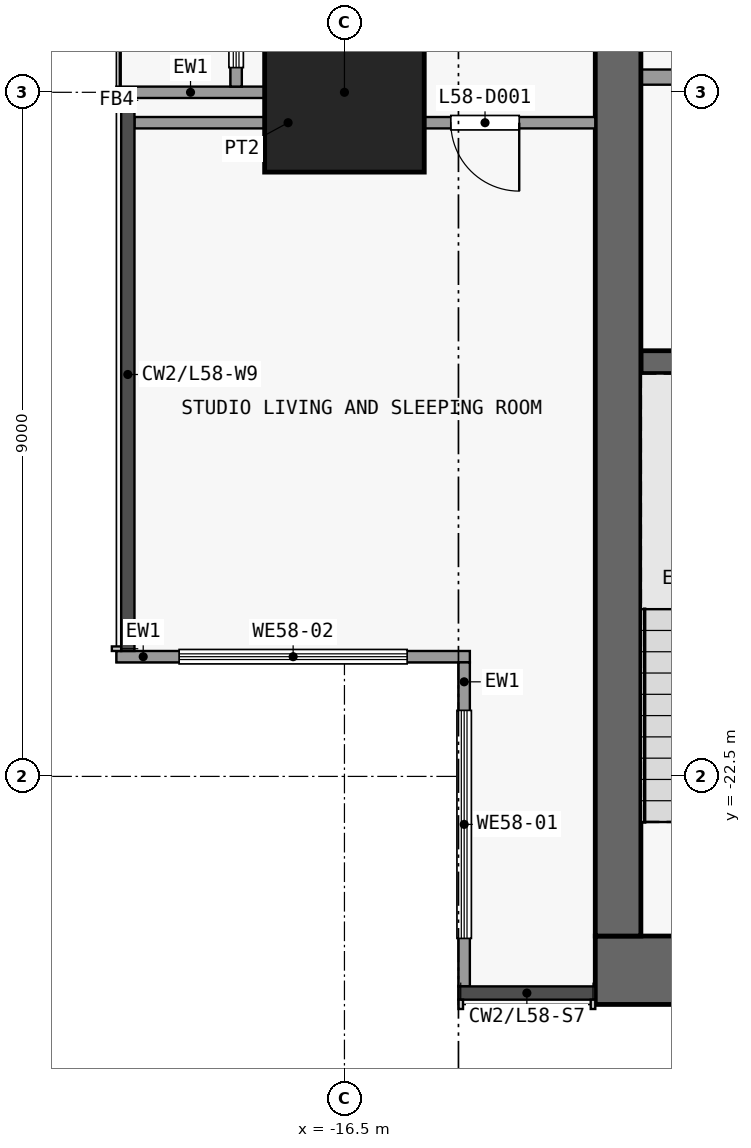
"""IFC4 building model, lengths in metres.
Left out: names, types, materials, properties, quantities, classifications, styles, units other than length and angle.
Written with IfcOpenShell. Run it as: python <this file> out.ifc"""

import sys

from ifc_helpers import new_model, si_unit, direction, frame, frame_2d, origin, origin_2d, place, context, subcontext, project, spatial, rectangle, extrude, element, fill, save


model = new_model("IFC4")
c1 = context("Model", 3, precision=1e-05, world=origin(), true_north=direction((0.0, 1.0)))
c2 = subcontext(c1, "Body", "Model", "MODEL_VIEW")
j1 = project(units=[si_unit("LENGTHUNIT", "METRE"), si_unit("PLANEANGLEUNIT", "RADIAN")], contexts=[c1])
p1 = place(None, origin())
s1 = spatial("IfcSite", under=j1, at=p1, CompositionType="ELEMENT")
p2 = place(p1, origin())
s2 = spatial("IfcBuilding", under=s1, at=p2, CompositionType="ELEMENT")
p3 = place(p2, frame((0.0, 0.0, 230.3)))
s3 = spatial("IfcBuildingStorey", under=s2, at=p3, CompositionType="ELEMENT", Elevation=230.3)
p4 = place(p3, frame((-16.5, -13.5, 0.0), z_axis=(0.0, 0.0, 1.0), x_axis=(1.0, 0.0, 0.0)))
e1 = element("IfcColumn", 1, at=p4, inside=s3, PredefinedType="COLUMN", context=c2, shape_type="SweptSolid", body=[
    extrude(rectangle(XDim=2.1, YDim=2.1, at=origin_2d()), origin(), (0.0, 0.0, 1.0), 3.6),
])
p5 = place(p3, frame((-13.2, -25.05, 0.0), z_axis=(0.0, 0.0, 1.0), x_axis=(1.0, 0.0, 0.0)))
e2 = element("IfcWall", 2, at=p5, inside=s3, PredefinedType="SHEAR", context=c2, shape_type="SweptSolid", body=[
    extrude(rectangle(XDim=26.4, YDim=0.9, at=frame_2d((13.2, 0.0))), origin(), (0.0, 0.0, 1.0), 3.3),
])
p6 = place(p3, frame((-12.9, -24.6, 0.0), z_axis=(0.0, 0.0, 1.0), x_axis=(0.0, 1.0, 0.0)))
e3 = element("IfcWall", 3, at=p6, inside=s3, PredefinedType="SHEAR", context=c2, shape_type="SweptSolid", body=[
    extrude(rectangle(XDim=16.1, YDim=0.6, at=frame_2d((8.05, 0.0))), origin(), (0.0, 0.0, 1.0), 3.3),
])
p7 = place(p3, frame((-12.6, -17.05, 0.0), z_axis=(0.0, 0.0, 1.0), x_axis=(1.0, 0.0, 0.0)))
e4 = element("IfcWall", 4, at=p7, inside=s3, PredefinedType="SHEAR", context=c2, shape_type="SweptSolid", body=[
    extrude(rectangle(XDim=3.1, YDim=0.3, at=frame_2d((1.55, 0.0))), origin(), (0.0, 0.0, 1.0), 3.3),
])
p8 = place(p3, frame((-12.6, -13.3, 0.0), z_axis=(0.0, 0.0, 1.0), x_axis=(1.0, 0.0, 0.0)))
e5 = element("IfcWall", 5, at=p8, inside=s3, PredefinedType="PARTITIONING", context=c2, shape_type="SweptSolid", body=[
    extrude(rectangle(XDim=1.45, YDim=0.2, at=frame_2d((0.725, 0.0))), origin(), (0.0, 0.0, 1.0), 3.3),
])
p9 = place(p3, frame((-14.925, -25.262, 0.0), z_axis=(0.0, 0.0, 1.0), x_axis=(0.0, 1.0, 0.0)))
e6 = element("IfcWall", 6, at=p9, inside=s3, PredefinedType="SOLIDWALL", context=c2, shape_type="SweptSolid", body=[
    extrude(rectangle(XDim=4.262, YDim=0.15, at=frame_2d((2.131, 0.0))), origin(), (0.0, 0.0, 1.0), 3.3),
])
p10 = place(p9, frame((0.631, 0.0, 0.9)))
e7 = element("IfcOpeningElement", 7, at=p10, cuts=e6, PredefinedType="OPENING", context=c2, shape_type="SweptSolid", body=[
    extrude(rectangle(XDim=3.0, YDim=2.4, at=frame_2d((1.5, 1.2))), frame((0.0, 0.085, 0.0), z_axis=(0.0, -1.0, 0.0), x_axis=(1.0, 0.0, 0.0)), (0.0, 0.0, 1.0), 0.17),
])
p11 = place(p3, frame((-14.85, -20.925, 0.0), z_axis=(0.0, 0.0, 1.0), x_axis=(-1.0, 0.0, 0.0)))
e8 = element("IfcWall", 8, at=p11, inside=s3, PredefinedType="SOLIDWALL", context=c2, shape_type="SweptSolid", body=[
    extrude(rectangle(XDim=4.65, YDim=0.15, at=frame_2d((2.325, 0.0))), origin(), (0.0, 0.0, 1.0), 3.3),
])
p12 = place(p11, frame((0.825, 0.0, 0.9)))
e9 = element("IfcOpeningElement", 9, at=p12, cuts=e8, PredefinedType="OPENING", context=c2, shape_type="SweptSolid", body=[
    extrude(rectangle(XDim=3.0, YDim=2.4, at=frame_2d((1.5, 1.2))), frame((0.0, 0.085, 0.0), z_axis=(0.0, -1.0, 0.0), x_axis=(1.0, 0.0, 0.0)), (0.0, 0.0, 1.0), 0.17),
])
p13 = place(p3, frame((-17.55, -13.5, 0.0), z_axis=(0.0, 0.0, 1.0), x_axis=(-1.0, 0.0, 0.0)))
e10 = element("IfcWall", 10, at=p13, inside=s3, PredefinedType="SOLIDWALL", context=c2, shape_type="SweptSolid", body=[
    extrude(rectangle(XDim=1.95, YDim=0.15, at=frame_2d((0.975, 0.0))), origin(), (0.0, 0.0, 1.0), 3.3),
])
p14 = place(p3, frame((-17.925, -13.425, 0.0), z_axis=(0.0, 0.0, 1.0), x_axis=(0.0, 1.0, 0.0)))
e11 = element("IfcWall", 11, at=p14, inside=s3, PredefinedType="SOLIDWALL", context=c2, shape_type="SweptSolid", body=[
    extrude(rectangle(XDim=8.85, YDim=0.15, at=frame_2d((4.425, 0.0))), origin(), (0.0, 0.0, 1.0), 3.3),
])
p15 = place(p14, frame((3.05, 0.0, 0.0)))
e12 = element("IfcOpeningElement", 12, at=p15, cuts=e11, PredefinedType="OPENING", context=c2, shape_type="SweptSolid", body=[
    extrude(rectangle(XDim=1.2, YDim=2.4, at=frame_2d((0.6, 1.2))), frame((0.0, 0.085, 0.0), z_axis=(0.0, -1.0, 0.0), x_axis=(1.0, 0.0, 0.0)), (0.0, 0.0, 1.0), 0.17),
])
p16 = place(p14, frame((0.25, 0.0, 0.9)))
e13 = element("IfcOpeningElement", 13, at=p16, cuts=e11, PredefinedType="OPENING", context=c2, shape_type="SweptSolid", body=[
    extrude(rectangle(XDim=2.05, YDim=2.1, at=frame_2d((1.025, 1.05))), frame((0.0, 0.085, 0.0), z_axis=(0.0, -1.0, 0.0), x_axis=(1.0, 0.0, 0.0)), (0.0, 0.0, 1.0), 0.17),
])
p17 = place(p14, frame((5.775, 0.0, 0.9)))
e14 = element("IfcOpeningElement", 14, at=p17, cuts=e11, PredefinedType="OPENING", context=c2, shape_type="SweptSolid", body=[
    extrude(rectangle(XDim=2.275, YDim=2.1, at=frame_2d((1.137, 1.05))), frame((0.0, 0.085, 0.0), z_axis=(0.0, -1.0, 0.0), x_axis=(1.0, 0.0, 0.0)), (0.0, 0.0, 1.0), 0.17),
])
p18 = place(p3, frame((-19.262, -13.9, 0.0), z_axis=(0.0, 0.0, 1.0), x_axis=(1.0, 0.0, 0.0)))
e15 = element("IfcWall", 15, at=p18, inside=s3, PredefinedType="PARTITIONING", context=c2, shape_type="SweptSolid", body=[
    extrude(rectangle(XDim=6.062, YDim=0.15, at=frame_2d((3.031, 0.0))), origin(), (0.0, 0.0, 1.0), 3.3),
])
p19 = place(p18, frame((4.162, 0.0, 0.0)))
e16 = element("IfcOpeningElement", 16, at=p19, cuts=e15, PredefinedType="OPENING", context=c2, shape_type="SweptSolid", body=[
    extrude(rectangle(XDim=0.9, YDim=2.1, at=frame_2d((0.45, 1.05))), frame((0.0, 0.085, 0.0), z_axis=(0.0, -1.0, 0.0), x_axis=(1.0, 0.0, 0.0)), (0.0, 0.0, 1.0), 0.17),
])
p20 = place(p3, frame((-16.2, -13.825, 0.0), z_axis=(0.0, 0.0, 1.0), x_axis=(0.0, 1.0, 0.0)))
e17 = element("IfcWall", 17, at=p20, inside=s3, PredefinedType="PARTITIONING", context=c2, shape_type="SweptSolid", body=[
    extrude(rectangle(XDim=2.85, YDim=0.15, at=frame_2d((1.425, 0.0))), origin(), (0.0, 0.0, 1.0), 3.3),
])
p21 = place(p10, origin())
e18 = element("IfcWindow", 18, at=p21, inside=s3, PartitioningType="SINGLE_PANEL", PredefinedType="WINDOW", context=c2, shape_type="SweptSolid", body=[
    extrude(rectangle(XDim=3.0, YDim=2.4, at=frame_2d((1.5, 1.2))), frame((0.0, 0.03, 0.0), z_axis=(0.0, -1.0, 0.0), x_axis=(1.0, 0.0, 0.0)), (0.0, 0.0, 1.0), 0.06),
])
fill(e7, e18)
p22 = place(p12, origin())
e19 = element("IfcWindow", 19, at=p22, inside=s3, PartitioningType="SINGLE_PANEL", PredefinedType="WINDOW", context=c2, shape_type="SweptSolid", body=[
    extrude(rectangle(XDim=3.0, YDim=2.4, at=frame_2d((1.5, 1.2))), frame((0.0, 0.03, 0.0), z_axis=(0.0, -1.0, 0.0), x_axis=(1.0, 0.0, 0.0)), (0.0, 0.0, 1.0), 0.06),
])
fill(e9, e19)
p23 = place(p16, origin())
e20 = element("IfcWindow", 20, at=p23, inside=s3, PartitioningType="SINGLE_PANEL", PredefinedType="WINDOW", context=c2, shape_type="SweptSolid", body=[
    extrude(rectangle(XDim=2.05, YDim=2.1, at=frame_2d((1.025, 1.05))), frame((0.0, 0.03, 0.0), z_axis=(0.0, -1.0, 0.0), x_axis=(1.0, 0.0, 0.0)), (0.0, 0.0, 1.0), 0.06),
])
fill(e13, e20)
p24 = place(p19, origin())
e21 = element("IfcDoor", 21, at=p24, inside=s3, OperationType="SINGLE_SWING_RIGHT", PredefinedType="DOOR", context=c2, shape_type="SweptSolid", body=[
    extrude(rectangle(XDim=0.9, YDim=2.1, at=frame_2d((0.45, 1.05))), frame((0.0, 0.025, 0.0), z_axis=(0.0, -1.0, 0.0), x_axis=(1.0, 0.0, 0.0)), (0.0, 0.0, 1.0), 0.05),
])
fill(e16, e21)
save(model, sys.argv[1])
